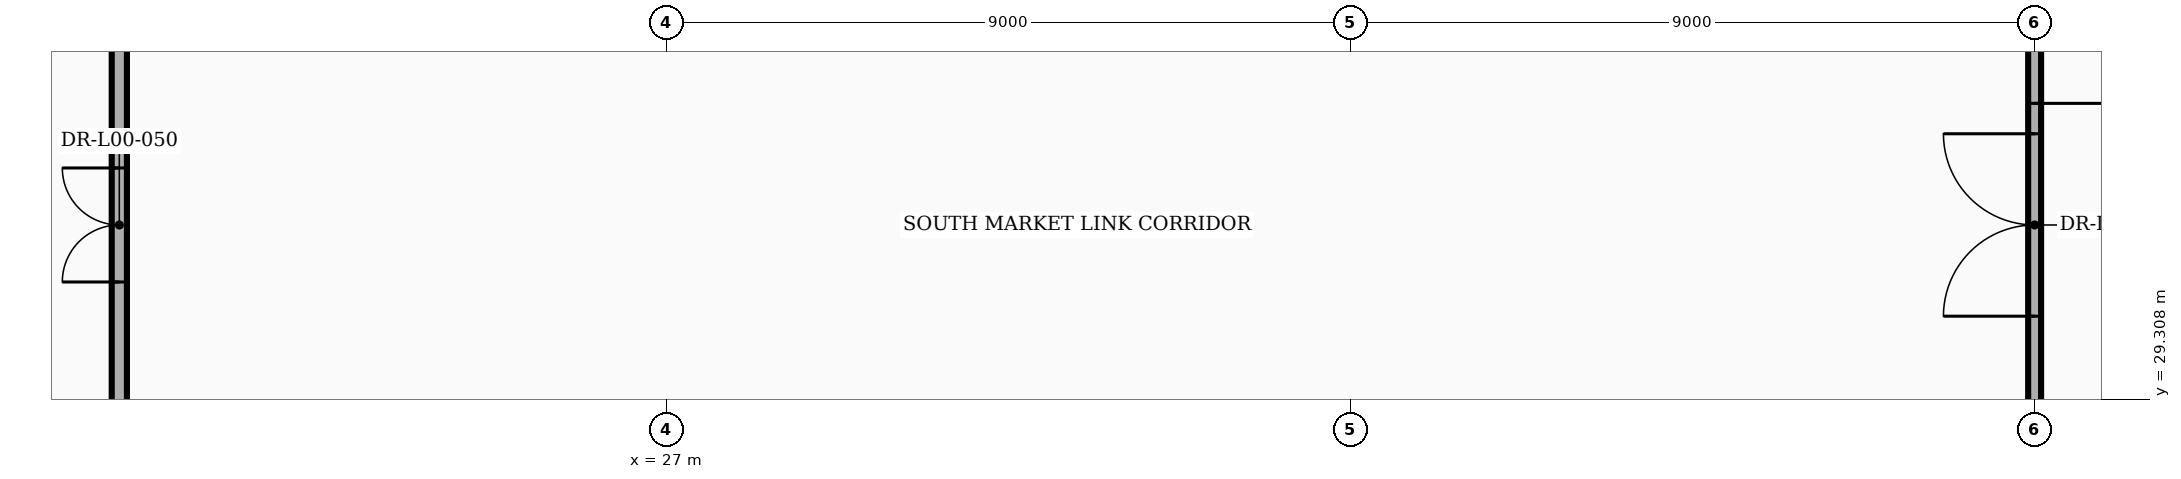
"""IFC4 building model, lengths in metres.
Left out: names, types, materials, properties, quantities, classifications, styles, units other than length and angle.
Written with IfcOpenShell. Run it as: python <this file> out.ifc"""

import sys

from ifc_helpers import new_model, si_unit, direction, frame, frame_2d, origin, place, context, subcontext, project, spatial, rectangle, extrude, element, fill, save


model = new_model("IFC4")
c1 = context("Model", 3, precision=1e-05, world=origin(), true_north=direction((0.0, 1.0)))
c2 = subcontext(c1, "Body", "Model", "MODEL_VIEW")
j1 = project(units=[si_unit("LENGTHUNIT", "METRE"), si_unit("PLANEANGLEUNIT", "RADIAN")], contexts=[c1])
p1 = place(None, origin())
s1 = spatial("IfcSite", under=j1, at=p1, CompositionType="ELEMENT")
p2 = place(p1, origin())
s2 = spatial("IfcBuilding", under=s1, at=p2, CompositionType="ELEMENT")
p3 = place(p2, origin())
s3 = spatial("IfcBuildingStorey", under=s2, at=p3, CompositionType="ELEMENT", Elevation=0.0)
p4 = place(p3, frame((19.8, 0.145, 0.0), z_axis=(0.0, 0.0, 1.0), x_axis=(0.0, 1.0, 0.0)))
e1 = element("IfcWall", 1, at=p4, inside=s3, PredefinedType="PARTITIONING", context=c2, shape_type="SweptSolid", body=[
    extrude(rectangle(XDim=39.095, YDim=0.2, at=frame_2d((19.547, 0.0))), origin(), (0.0, 0.0, 1.0), 5.75),
])
p5 = place(p4, frame((5.965, 0.0, 0.0)))
e2 = element("IfcOpeningElement", 2, at=p5, cuts=e1, PredefinedType="OPENING", context=c2, shape_type="SweptSolid", body=[
    extrude(rectangle(XDim=1.1, YDim=2.2, at=frame_2d((0.55, 1.1))), frame((0.0, 0.112, 0.0), z_axis=(0.0, -1.0, 0.0), x_axis=(1.0, 0.0, 0.0)), (0.0, 0.0, 1.0), 0.224),
])
p6 = place(p4, frame((20.755, 0.0, 0.0)))
e3 = element("IfcOpeningElement", 3, at=p6, cuts=e1, PredefinedType="OPENING", context=c2, shape_type="SweptSolid", body=[
    extrude(rectangle(XDim=1.9, YDim=2.35, at=frame_2d((0.95, 1.175))), frame((0.0, 0.112, 0.0), z_axis=(0.0, -1.0, 0.0), x_axis=(1.0, 0.0, 0.0)), (0.0, 0.0, 1.0), 0.224),
])
p7 = place(p4, frame((30.705, 0.0, 0.0)))
e4 = element("IfcOpeningElement", 4, at=p7, cuts=e1, PredefinedType="OPENING", context=c2, shape_type="SweptSolid", body=[
    extrude(rectangle(XDim=1.5, YDim=2.2, at=frame_2d((0.75, 1.1))), frame((0.0, 0.112, 0.0), z_axis=(0.0, -1.0, 0.0), x_axis=(1.0, 0.0, 0.0)), (0.0, 0.0, 1.0), 0.224),
])
p8 = place(p3, frame((45.0, 27.22, 0.0), z_axis=(0.0, 0.0, 1.0), x_axis=(0.0, 1.0, 0.0)))
e5 = element("IfcWall", 5, at=p8, inside=s3, PredefinedType="PARTITIONING", context=c2, shape_type="SweptSolid", body=[
    extrude(rectangle(XDim=8.56, YDim=0.17, at=frame_2d((4.28, 0.0))), origin(), (0.0, 0.0, 1.0), 5.217),
])
p9 = place(p8, frame((5.98, 0.0, 0.0)))
e6 = element("IfcOpeningElement", 6, at=p9, cuts=e5, PredefinedType="OPENING", context=c2, shape_type="SweptSolid", body=[
    extrude(rectangle(XDim=2.4, YDim=2.35, at=frame_2d((1.2, 1.175))), frame((0.0, 0.097, 0.0), z_axis=(0.0, -1.0, 0.0), x_axis=(1.0, 0.0, 0.0)), (0.0, 0.0, 1.0), 0.194),
])
p10 = place(p8, frame((3.18, 0.0, 0.0)))
e7 = element("IfcOpeningElement", 7, at=p10, cuts=e5, PredefinedType="OPENING", context=c2, shape_type="SweptSolid", body=[
    extrude(rectangle(XDim=2.4, YDim=2.2, at=frame_2d((1.2, 1.1))), frame((0.0, 0.097, 0.0), z_axis=(0.0, -1.0, 0.0), x_axis=(1.0, 0.0, 0.0)), (0.0, 0.0, 1.0), 0.194),
])
p11 = place(p7, origin())
e8 = element("IfcDoor", 8, at=p11, inside=s3, OperationType="DOUBLE_DOOR_SINGLE_SWING", PredefinedType="DOOR", context=c2, shape_type="SweptSolid", body=[
    extrude(rectangle(XDim=1.5, YDim=2.2, at=frame_2d((0.75, 1.1))), frame((0.0, 0.025, 0.0), z_axis=(0.0, -1.0, 0.0), x_axis=(1.0, 0.0, 0.0)), (0.0, 0.0, 1.0), 0.05),
])
fill(e4, e8)
p12 = place(p9, frame((2.4, 0.0, 0.0), z_axis=(0.0, 0.0, 1.0), x_axis=(-1.0, 0.0, 0.0)))
e9 = element("IfcDoor", 9, at=p12, inside=s3, OperationType="DOUBLE_DOOR_SINGLE_SWING", PredefinedType="DOOR", context=c2, shape_type="SweptSolid", body=[
    extrude(rectangle(XDim=2.4, YDim=2.35, at=frame_2d((1.2, 1.175))), frame((0.0, 0.025, 0.0), z_axis=(0.0, -1.0, 0.0), x_axis=(1.0, 0.0, 0.0)), (0.0, 0.0, 1.0), 0.05),
])
fill(e6, e9)
p13 = place(p10, origin())
e10 = element("IfcDoor", 10, at=p13, inside=s3, OperationType="DOUBLE_DOOR_SINGLE_SWING", PredefinedType="DOOR", context=c2, shape_type="SweptSolid", body=[
    extrude(rectangle(XDim=2.4, YDim=2.2, at=frame_2d((1.2, 1.1))), frame((0.0, 0.025, 0.0), z_axis=(0.0, -1.0, 0.0), x_axis=(1.0, 0.0, 0.0)), (0.0, 0.0, 1.0), 0.05),
])
fill(e7, e10)
save(model, sys.argv[1])
